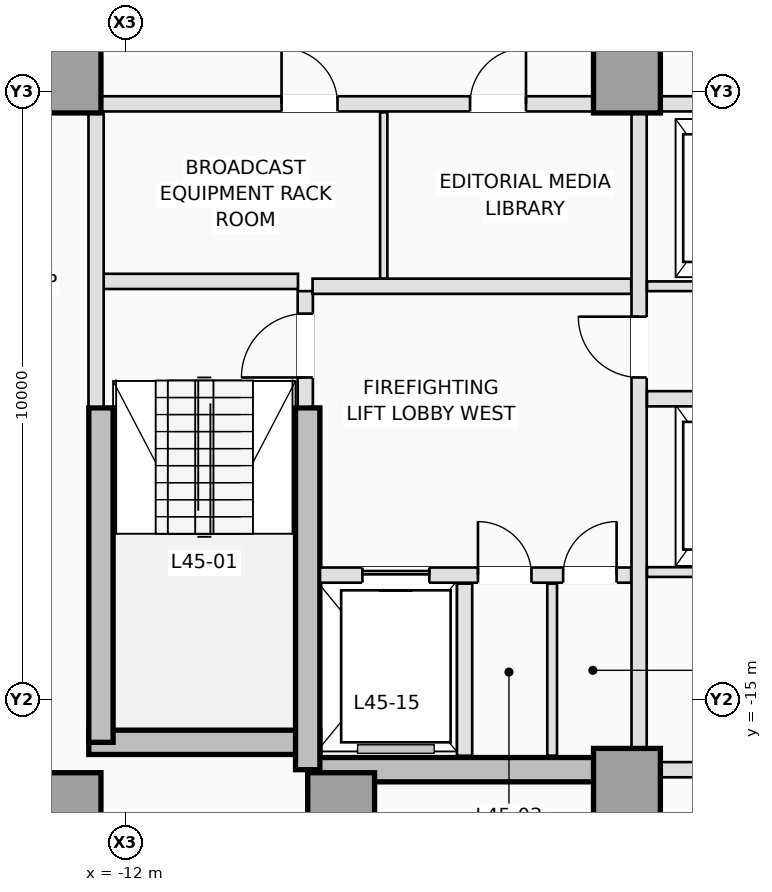
"""IFC4 building model, lengths in metres.
Left out: names, types, materials, properties, quantities, classifications, styles, units other than length and angle.
Written with IfcOpenShell. Run it as: python <this file> out.ifc"""

import sys

from ifc_helpers import new_model, si_unit, direction, frame, frame_2d, origin, origin_2d, place, context, subcontext, project, spatial, rectangle, extrude, element, fill, save


model = new_model("IFC4")
c1 = context("Model", 3, precision=1e-05, world=origin(), true_north=direction((0.0, 1.0)))
c2 = subcontext(c1, "Body", "Model", "MODEL_VIEW")
j1 = project(units=[si_unit("LENGTHUNIT", "METRE"), si_unit("PLANEANGLEUNIT", "RADIAN")], contexts=[c1])
p1 = place(None, origin())
s1 = spatial("IfcSite", under=j1, at=p1, CompositionType="ELEMENT")
p2 = place(p1, origin())
s2 = spatial("IfcBuilding", under=s1, at=p2, CompositionType="ELEMENT")
p3 = place(p2, frame((0.0, 0.0, 165.0)))
s3 = spatial("IfcBuildingStorey", under=s2, at=p3, CompositionType="ELEMENT", Elevation=165.0)
p4 = place(p3, frame((-12.6, -15.7, 0.0), z_axis=(0.0, 0.0, 1.0), x_axis=(1.0, 0.0, 0.0)))
e1 = element("IfcWall", 1, at=p4, inside=s3, PredefinedType="SHEAR", context=c2, shape_type="SweptSolid", body=[
    extrude(rectangle(XDim=3.8, YDim=0.4, at=frame_2d((1.9, 0.0))), origin(), (0.0, 0.0, 1.0), 3.5),
])
p5 = place(p3, frame((-9.0, -16.15, 0.0), z_axis=(0.0, 0.0, 1.0), x_axis=(1.0, 0.0, 0.0)))
e2 = element("IfcWall", 2, at=p5, inside=s3, PredefinedType="SHEAR", context=c2, shape_type="SweptSolid", body=[
    extrude(rectangle(XDim=5.25, YDim=0.4, at=frame_2d((2.625, 0.0))), origin(), (0.0, 0.0, 1.0), 3.5),
])
p6 = place(p3, frame((-12.4, -15.7, 0.0), z_axis=(0.0, 0.0, 1.0), x_axis=(0.0, 1.0, 0.0)))
e3 = element("IfcWall", 3, at=p6, inside=s3, PredefinedType="SHEAR", context=c2, shape_type="SweptSolid", body=[
    extrude(rectangle(XDim=5.5, YDim=0.4, at=frame_2d((2.75, 0.0))), origin(), (0.0, 0.0, 1.0), 3.5),
])
p7 = place(p3, frame((-9.0, -16.15, 0.0), z_axis=(0.0, 0.0, 1.0), x_axis=(0.0, 1.0, 0.0)))
e4 = element("IfcWall", 4, at=p7, inside=s3, PredefinedType="SHEAR", context=c2, shape_type="SweptSolid", body=[
    extrude(rectangle(XDim=5.95, YDim=0.4, at=frame_2d((2.975, 0.0))), origin(), (0.0, 0.0, 1.0), 3.5),
])
for number, where, z_axis, x_axis in (
    (5, (-12.95, -16.75, 0.0), (0.0, 0.0, 1.0), (1.0, 0.0, 0.0)),
    (6, (-8.45, -16.75, 0.0), (0.0, 0.0, 1.0), (1.0, 0.0, 0.0)),
    (7, (-3.75, -16.35, 0.0), (0.0, 0.0, 1.0), (1.0, 0.0, 0.0)),
    (8, (-12.95, -4.8, 0.0), (0.0, 0.0, 1.0), (1.0, 0.0, 0.0)),
    (9, (-3.75, -4.8, 0.0), (0.0, 0.0, 1.0), (1.0, 0.0, 0.0)),
):
    element("IfcColumn", number, at=place(p3, frame(where, z_axis=z_axis, x_axis=x_axis)), inside=s3, PredefinedType="COLUMN", context=c2, shape_type="SweptSolid", body=[
        extrude(rectangle(XDim=1.1, YDim=1.1, at=origin_2d()), origin(), (0.0, 0.0, 1.0), 3.5),
    ])
p8 = place(p3, frame((-9.04, -10.18, 0.0), z_axis=(0.0, 0.0, 1.0), x_axis=(0.0, 1.0, 0.0)))
e10 = element("IfcWall", 10, at=p8, inside=s3, PredefinedType="PARTITIONING", context=c2, shape_type="SweptSolid", body=[
    extrude(rectangle(XDim=1.9, YDim=0.25, at=frame_2d((0.95, 0.0))), origin(), (0.0, 0.0, 1.0), 3.25),
])
p9 = place(p8, frame((0.48, 0.0, 0.0)))
e11 = element("IfcOpeningElement", 11, at=p9, cuts=e10, PredefinedType="OPENING", context=c2, shape_type="SweptSolid", body=[
    extrude(rectangle(XDim=1.05, YDim=2.15, at=frame_2d((0.525, 1.075))), frame((0.0, 0.135, 0.0), z_axis=(0.0, -1.0, 0.0), x_axis=(1.0, 0.0, 0.0)), (0.0, 0.0, 1.0), 0.27),
])
p10 = place(p3, frame((-12.38, -8.12, 0.0), z_axis=(0.0, 0.0, 1.0), x_axis=(1.0, 0.0, 0.0)))
e12 = element("IfcWall", 12, at=p10, inside=s3, PredefinedType="PARTITIONING", context=c2, shape_type="SweptSolid", body=[
    extrude(rectangle(XDim=3.22, YDim=0.25, at=frame_2d((1.61, 0.0))), origin(), (0.0, 0.0, 1.0), 3.25),
])
p11 = place(p3, frame((-12.48, -10.18, 0.0), z_axis=(0.0, 0.0, 1.0), x_axis=(0.0, 1.0, 0.0)))
e13 = element("IfcWall", 13, at=p11, inside=s3, PredefinedType="PARTITIONING", context=c2, shape_type="SweptSolid", body=[
    extrude(rectangle(XDim=4.828, YDim=0.25, at=frame_2d((2.414, 0.0))), origin(), (0.0, 0.0, 1.0), 3.25),
])
p12 = place(p3, frame((-8.798, -12.95, 0.0), z_axis=(0.0, 0.0, 1.0), x_axis=(1.0, 0.0, 0.0)))
e14 = element("IfcWall", 14, at=p12, inside=s3, PredefinedType="PARTITIONING", context=c2, shape_type="SweptSolid", body=[
    extrude(rectangle(XDim=5.118, YDim=0.25, at=frame_2d((2.559, 0.0))), origin(), (0.0, 0.0, 1.0), 3.25),
])
p13 = place(p12, frame((0.698, 0.0, 0.0)))
e15 = element("IfcOpeningElement", 15, at=p13, cuts=e14, PredefinedType="OPENING", context=c2, shape_type="SweptSolid", body=[
    extrude(rectangle(XDim=1.1, YDim=2.15, at=frame_2d((0.55, 1.075))), frame((0.0, 0.135, 0.0), z_axis=(0.0, -1.0, 0.0), x_axis=(1.0, 0.0, 0.0)), (0.0, 0.0, 1.0), 0.27),
])
p14 = place(p12, frame((2.598, 0.0, 0.0)))
e16 = element("IfcOpeningElement", 16, at=p14, cuts=e14, PredefinedType="OPENING", context=c2, shape_type="SweptSolid", body=[
    extrude(rectangle(XDim=0.88, YDim=2.1, at=frame_2d((0.44, 1.05))), frame((0.0, 0.135, 0.0), z_axis=(0.0, -1.0, 0.0), x_axis=(1.0, 0.0, 0.0)), (0.0, 0.0, 1.0), 0.27),
])
p15 = place(p12, frame((3.998, 0.0, 0.0)))
e17 = element("IfcOpeningElement", 17, at=p15, cuts=e14, PredefinedType="OPENING", context=c2, shape_type="SweptSolid", body=[
    extrude(rectangle(XDim=0.88, YDim=2.1, at=frame_2d((0.44, 1.05))), frame((0.0, 0.135, 0.0), z_axis=(0.0, -1.0, 0.0), x_axis=(1.0, 0.0, 0.0)), (0.0, 0.0, 1.0), 0.27),
])
p16 = place(p3, frame((-6.42, -15.92, 0.0), z_axis=(0.0, 0.0, 1.0), x_axis=(0.0, 1.0, 0.0)))
e18 = element("IfcWall", 18, at=p16, inside=s3, PredefinedType="PARTITIONING", context=c2, shape_type="SweptSolid", body=[
    extrude(rectangle(XDim=2.83, YDim=0.25, at=frame_2d((1.415, 0.0))), origin(), (0.0, 0.0, 1.0), 3.25),
])
p17 = place(p3, frame((-4.98, -15.92, 0.0), z_axis=(0.0, 0.0, 1.0), x_axis=(0.0, 1.0, 0.0)))
e19 = element("IfcWall", 19, at=p17, inside=s3, PredefinedType="PARTITIONING", context=c2, shape_type="SweptSolid", body=[
    extrude(rectangle(XDim=2.83, YDim=0.16, at=frame_2d((1.415, 0.0))), origin(), (0.0, 0.0, 1.0), 3.25),
])
p18 = place(p3, frame((-8.92, -8.2, 0.0), z_axis=(0.0, 0.0, 1.0), x_axis=(1.0, 0.0, 0.0)))
e20 = element("IfcWall", 20, at=p18, inside=s3, PredefinedType="PARTITIONING", context=c2, shape_type="SweptSolid", body=[
    extrude(rectangle(XDim=5.24, YDim=0.25, at=frame_2d((2.62, 0.0))), origin(), (0.0, 0.0, 1.0), 3.25),
])
p19 = place(p3, frame((-3.55, -15.798, 0.0), z_axis=(0.0, 0.0, 1.0), x_axis=(0.0, 1.0, 0.0)))
e21 = element("IfcWall", 21, at=p19, inside=s3, PredefinedType="PARTITIONING", context=c2, shape_type="SweptSolid", body=[
    extrude(rectangle(XDim=10.446, YDim=0.25, at=frame_2d((5.223, 0.0))), origin(), (0.0, 0.0, 1.0), 3.25),
])
p20 = place(p19, frame((6.098, 0.0, 0.0)))
e22 = element("IfcOpeningElement", 22, at=p20, cuts=e21, PredefinedType="OPENING", context=c2, shape_type="SweptSolid", body=[
    extrude(rectangle(XDim=1.0, YDim=2.15, at=frame_2d((0.5, 1.075))), frame((0.0, 0.135, 0.0), z_axis=(0.0, -1.0, 0.0), x_axis=(1.0, 0.0, 0.0)), (0.0, 0.0, 1.0), 0.27),
])
p21 = place(p3, frame((-12.398, -5.2, 0.0), z_axis=(0.0, 0.0, 1.0), x_axis=(1.0, 0.0, 0.0)))
e23 = element("IfcWall", 23, at=p21, inside=s3, PredefinedType="PARTITIONING", context=c2, shape_type="SweptSolid", body=[
    extrude(rectangle(XDim=8.096, YDim=0.25, at=frame_2d((4.048, 0.0))), origin(), (0.0, 0.0, 1.0), 3.25),
])
p22 = place(p21, frame((2.968, 0.0, 0.0)))
e24 = element("IfcOpeningElement", 24, at=p22, cuts=e23, PredefinedType="OPENING", context=c2, shape_type="SweptSolid", body=[
    extrude(rectangle(XDim=0.92, YDim=2.12, at=frame_2d((0.46, 1.06))), frame((0.0, 0.135, 0.0), z_axis=(0.0, -1.0, 0.0), x_axis=(1.0, 0.0, 0.0)), (0.0, 0.0, 1.0), 0.27),
])
p23 = place(p21, frame((6.068, 0.0, 0.0)))
e25 = element("IfcOpeningElement", 25, at=p23, cuts=e23, PredefinedType="OPENING", context=c2, shape_type="SweptSolid", body=[
    extrude(rectangle(XDim=0.92, YDim=2.12, at=frame_2d((0.46, 1.06))), frame((0.0, 0.135, 0.0), z_axis=(0.0, -1.0, 0.0), x_axis=(1.0, 0.0, 0.0)), (0.0, 0.0, 1.0), 0.27),
])
p24 = place(p3, frame((-3.198, -5.2, 0.0), z_axis=(0.0, 0.0, 1.0), x_axis=(1.0, 0.0, 0.0)))
e26 = element("IfcWall", 26, at=p24, inside=s3, PredefinedType="PARTITIONING", context=c2, shape_type="SweptSolid", body=[
    extrude(rectangle(XDim=2.248, YDim=0.25, at=frame_2d((1.124, 0.0))), origin(), (0.0, 0.0, 1.0), 3.25),
])
p25 = place(p24, frame((0.698, 0.0, 0.0)))
e27 = element("IfcOpeningElement", 27, at=p25, cuts=e26, PredefinedType="OPENING", context=c2, shape_type="SweptSolid", body=[
    extrude(rectangle(XDim=1.0, YDim=2.15, at=frame_2d((0.5, 1.075))), frame((0.0, 0.135, 0.0), z_axis=(0.0, -1.0, 0.0), x_axis=(1.0, 0.0, 0.0)), (0.0, 0.0, 1.0), 0.27),
])
p26 = place(p3, frame((-7.75, -8.073, 0.0), z_axis=(0.0, 0.0, 1.0), x_axis=(0.0, 1.0, 0.0)))
e28 = element("IfcWall", 28, at=p26, inside=s3, PredefinedType="PARTITIONING", context=c2, shape_type="SweptSolid", body=[
    extrude(rectangle(XDim=2.733, YDim=0.12, at=frame_2d((1.366, 0.0))), origin(), (0.0, 0.0, 1.0), 3.25),
])
p27 = place(p3, frame((-3.198, -16.15, 0.0), z_axis=(0.0, 0.0, 1.0), x_axis=(1.0, 0.0, 0.0)))
e29 = element("IfcWall", 29, at=p27, inside=s3, PredefinedType="PARTITIONING", context=c2, shape_type="SweptSolid", body=[
    extrude(rectangle(XDim=6.396, YDim=0.25, at=frame_2d((3.198, 0.0))), origin(), (0.0, 0.0, 1.0), 2.45),
])
p28 = place(p3, frame((-3.42, -8.2, 0.0), z_axis=(0.0, 0.0, 1.0), x_axis=(1.0, 0.0, 0.0)))
e30 = element("IfcWall", 30, at=p28, inside=s3, PredefinedType="PARTITIONING", context=c2, shape_type="SweptSolid", body=[
    extrude(rectangle(XDim=2.47, YDim=0.16, at=frame_2d((1.235, 0.0))), origin(), (0.0, 0.0, 1.0), 3.25),
])
p29 = place(p3, frame((-3.42, -10.05, 0.0), z_axis=(0.0, 0.0, 1.0), x_axis=(1.0, 0.0, 0.0)))
e31 = element("IfcWall", 31, at=p29, inside=s3, PredefinedType="PARTITIONING", context=c2, shape_type="SweptSolid", body=[
    extrude(rectangle(XDim=2.47, YDim=0.25, at=frame_2d((1.235, 0.0))), origin(), (0.0, 0.0, 1.0), 3.25),
])
p30 = place(p29, frame((0.92, 0.0, 0.0)))
e32 = element("IfcOpeningElement", 32, at=p30, cuts=e31, PredefinedType="OPENING", context=c2, shape_type="SweptSolid", body=[
    extrude(rectangle(XDim=1.0, YDim=2.15, at=frame_2d((0.5, 1.075))), frame((0.0, 0.135, 0.0), z_axis=(0.0, -1.0, 0.0), x_axis=(1.0, 0.0, 0.0)), (0.0, 0.0, 1.0), 0.27),
])
p31 = place(p3, frame((-3.42, -12.9, 0.0), z_axis=(0.0, 0.0, 1.0), x_axis=(1.0, 0.0, 0.0)))
e33 = element("IfcWall", 33, at=p31, inside=s3, PredefinedType="PARTITIONING", context=c2, shape_type="SweptSolid", body=[
    extrude(rectangle(XDim=6.84, YDim=0.16, at=frame_2d((3.42, 0.0))), origin(), (0.0, 0.0, 1.0), 3.25),
])
p32 = place(p31, frame((2.98, 0.0, 0.0)))
e34 = element("IfcOpeningElement", 34, at=p32, cuts=e33, PredefinedType="OPENING", context=c2, shape_type="SweptSolid", body=[
    extrude(rectangle(XDim=0.88, YDim=2.12, at=frame_2d((0.44, 1.06))), frame((0.0, 0.09, 0.0), z_axis=(0.0, -1.0, 0.0), x_axis=(1.0, 0.0, 0.0)), (0.0, 0.0, 1.0), 0.18),
])
p33 = place(p13, origin())
e35 = element("IfcDoor", 35, at=p33, inside=s3, OperationType="SLIDING_TO_LEFT", PredefinedType="DOOR", context=c2, shape_type="SweptSolid", body=[
    extrude(rectangle(XDim=1.1, YDim=2.15, at=frame_2d((0.55, 1.075))), frame((0.0, 0.025, 0.0), z_axis=(0.0, -1.0, 0.0), x_axis=(1.0, 0.0, 0.0)), (0.0, 0.0, 1.0), 0.05),
])
fill(e15, e35)
p34 = place(p9, origin())
e36 = element("IfcDoor", 36, at=p34, inside=s3, OperationType="SINGLE_SWING_LEFT", PredefinedType="DOOR", context=c2, shape_type="SweptSolid", body=[
    extrude(rectangle(XDim=1.05, YDim=2.15, at=frame_2d((0.525, 1.075))), frame((0.0, 0.025, 0.0), z_axis=(0.0, -1.0, 0.0), x_axis=(1.0, 0.0, 0.0)), (0.0, 0.0, 1.0), 0.05),
])
fill(e11, e36)
p35 = place(p14, origin())
e37 = element("IfcDoor", 37, at=p35, inside=s3, OperationType="SINGLE_SWING_LEFT", PredefinedType="TRAPDOOR", context=c2, shape_type="SweptSolid", body=[
    extrude(rectangle(XDim=0.88, YDim=2.1, at=frame_2d((0.44, 1.05))), frame((0.0, 0.025, 0.0), z_axis=(0.0, -1.0, 0.0), x_axis=(1.0, 0.0, 0.0)), (0.0, 0.0, 1.0), 0.05),
])
fill(e16, e37)
p36 = place(p15, origin())
e38 = element("IfcDoor", 38, at=p36, inside=s3, OperationType="SINGLE_SWING_RIGHT", PredefinedType="TRAPDOOR", context=c2, shape_type="SweptSolid", body=[
    extrude(rectangle(XDim=0.88, YDim=2.1, at=frame_2d((0.44, 1.05))), frame((0.0, 0.025, 0.0), z_axis=(0.0, -1.0, 0.0), x_axis=(1.0, 0.0, 0.0)), (0.0, 0.0, 1.0), 0.05),
])
fill(e17, e38)
p37 = place(p20, origin())
e39 = element("IfcDoor", 39, at=p37, inside=s3, OperationType="SINGLE_SWING_RIGHT", PredefinedType="DOOR", context=c2, shape_type="SweptSolid", body=[
    extrude(rectangle(XDim=1.0, YDim=2.15, at=frame_2d((0.5, 1.075))), frame((0.0, 0.025, 0.0), z_axis=(0.0, -1.0, 0.0), x_axis=(1.0, 0.0, 0.0)), (0.0, 0.0, 1.0), 0.05),
])
fill(e22, e39)
p38 = place(p22, origin())
e40 = element("IfcDoor", 40, at=p38, inside=s3, OperationType="SINGLE_SWING_LEFT", PredefinedType="DOOR", context=c2, shape_type="SweptSolid", body=[
    extrude(rectangle(XDim=0.92, YDim=2.12, at=frame_2d((0.46, 1.06))), frame((0.0, 0.025, 0.0), z_axis=(0.0, -1.0, 0.0), x_axis=(1.0, 0.0, 0.0)), (0.0, 0.0, 1.0), 0.05),
])
fill(e24, e40)
p39 = place(p23, origin())
e41 = element("IfcDoor", 41, at=p39, inside=s3, OperationType="SINGLE_SWING_RIGHT", PredefinedType="DOOR", context=c2, shape_type="SweptSolid", body=[
    extrude(rectangle(XDim=0.92, YDim=2.12, at=frame_2d((0.46, 1.06))), frame((0.0, 0.025, 0.0), z_axis=(0.0, -1.0, 0.0), x_axis=(1.0, 0.0, 0.0)), (0.0, 0.0, 1.0), 0.05),
])
fill(e25, e41)
save(model, sys.argv[1])
